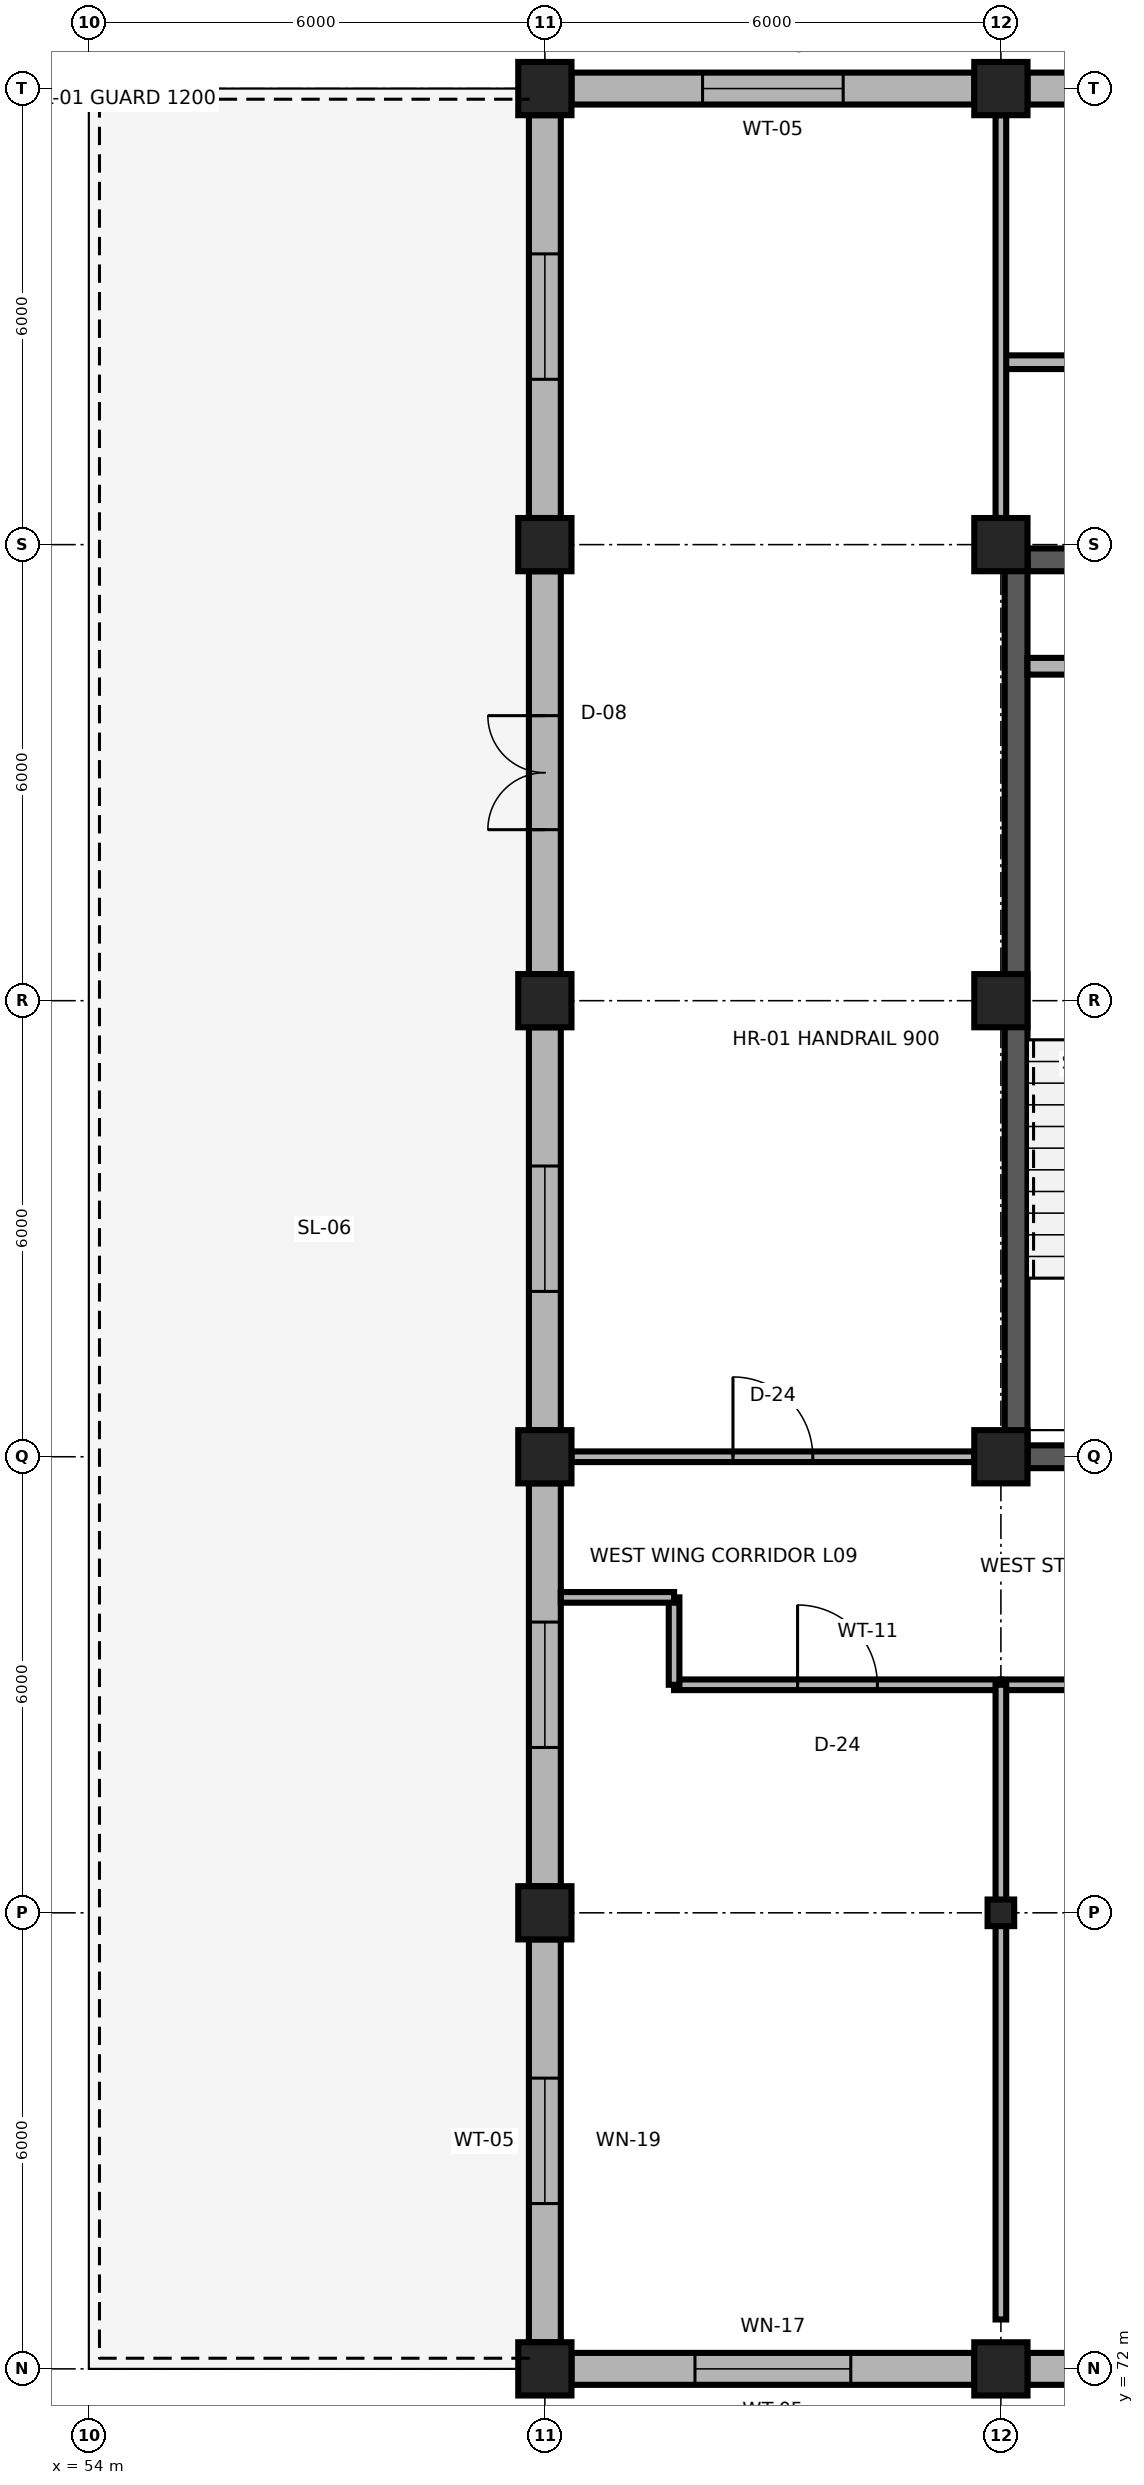
"""IFC4 building model, lengths in metres.
Left out: names, types, materials, properties, quantities, classifications, styles, units other than length and angle.
Written with IfcOpenShell. Run it as: python <this file> out.ifc"""

import sys

from ifc_helpers import new_model, si_unit, direction, frame, frame_2d, origin, origin_2d, place, context, subcontext, project, spatial, rectangle, i_section, extrude, element, fill, save


model = new_model("IFC4")
c1 = context("Model", 3, precision=1e-05, world=origin(), true_north=direction((0.0, 1.0)))
c2 = subcontext(c1, "Body", "Model", "MODEL_VIEW")
j1 = project(units=[si_unit("LENGTHUNIT", "METRE"), si_unit("PLANEANGLEUNIT", "RADIAN")], contexts=[c1])
p1 = place(None, origin())
s1 = spatial("IfcSite", under=j1, at=p1, CompositionType="ELEMENT")
p2 = place(p1, origin())
s2 = spatial("IfcBuilding", under=s1, at=p2, CompositionType="ELEMENT")
p3 = place(p2, frame((0.0, 0.0, 36.6)))
s3 = spatial("IfcBuildingStorey", under=s2, at=p3, CompositionType="ELEMENT", Elevation=36.6)
for number, where, z_axis, x_axis in (
    (1, (60.0, 72.0, 0.0), (0.0, 0.0, 1.0), (1.0, 0.0, 0.0)),
    (2, (66.0, 72.0, 0.0), (0.0, 0.0, 1.0), (1.0, 0.0, 0.0)),
    (3, (60.0, 78.0, 0.0), (0.0, 0.0, 1.0), (1.0, 0.0, 0.0)),
):
    element("IfcColumn", number, at=place(p3, frame(where, z_axis=z_axis, x_axis=x_axis)), inside=s3, PredefinedType="COLUMN", context=c2, shape_type="SweptSolid", body=[
        extrude(rectangle(XDim=0.7, YDim=0.7, at=origin_2d()), origin(), (0.0, 0.0, 1.0), 3.9),
    ])
p4 = place(p3, frame((66.0, 78.0, 0.0), z_axis=(0.0, 0.0, 1.0), x_axis=(1.0, 0.0, 0.0)))
e4 = element("IfcColumn", 4, at=p4, inside=s3, PredefinedType="COLUMN", context=c2, shape_type="SweptSolid", body=[
    extrude(i_section(OverallWidth=0.35, OverallDepth=0.35, WebThickness=0.012, FlangeThickness=0.019, FilletRadius=0.02, at=origin_2d()), origin(), (0.0, 0.0, 1.0), 3.9),
])
for number, where, z_axis, x_axis in (
    (5, (60.0, 84.0, 0.0), (0.0, 0.0, 1.0), (1.0, 0.0, 0.0)),
    (6, (66.0, 84.0, 0.0), (0.0, 0.0, 1.0), (1.0, 0.0, 0.0)),
    (7, (60.0, 90.0, 0.0), (0.0, 0.0, 1.0), (1.0, 0.0, 0.0)),
    (8, (66.0, 90.0, 0.0), (0.0, 0.0, 1.0), (1.0, 0.0, 0.0)),
    (9, (60.0, 96.0, 0.0), (0.0, 0.0, 1.0), (1.0, 0.0, 0.0)),
    (10, (66.0, 96.0, 0.0), (0.0, 0.0, 1.0), (1.0, 0.0, 0.0)),
    (11, (60.0, 102.0, 0.0), (0.0, 0.0, 1.0), (1.0, 0.0, 0.0)),
    (12, (66.0, 102.0, 0.0), (0.0, 0.0, 1.0), (1.0, 0.0, 0.0)),
):
    element("IfcColumn", number, at=place(p3, frame(where, z_axis=z_axis, x_axis=x_axis)), inside=s3, PredefinedType="COLUMN", context=c2, shape_type="SweptSolid", body=[
        extrude(rectangle(XDim=0.7, YDim=0.7, at=origin_2d()), origin(), (0.0, 0.0, 1.0), 3.9),
    ])
p5 = place(p3, frame((60.35, 72.0, 0.0), z_axis=(0.0, 0.0, 1.0), x_axis=(1.0, 0.0, 0.0)))
e13 = element("IfcWall", 13, at=p5, inside=s3, PredefinedType="SOLIDWALL", context=c2, shape_type="SweptSolid", body=[
    extrude(rectangle(XDim=5.3, YDim=0.42, at=frame_2d((2.65, 0.0))), origin(), (0.0, 0.0, 1.0), 3.32),
])
p6 = place(p5, frame((1.625, 0.0, 0.85)))
e14 = element("IfcOpeningElement", 14, at=p6, cuts=e13, PredefinedType="OPENING", context=c2, shape_type="SweptSolid", body=[
    extrude(rectangle(XDim=2.05, YDim=2.0, at=frame_2d((1.025, 1.0))), frame((0.0, 0.225, 0.0), z_axis=(0.0, -1.0, 0.0), x_axis=(1.0, 0.0, 0.0)), (0.0, 0.0, 1.0), 0.45),
])
p7 = place(p3, frame((66.35, 72.0, 0.0), z_axis=(0.0, 0.0, 1.0), x_axis=(1.0, 0.0, 0.0)))
e15 = element("IfcWall", 15, at=p7, inside=s3, PredefinedType="SOLIDWALL", context=c2, shape_type="SweptSolid", body=[
    extrude(rectangle(XDim=5.3, YDim=0.42, at=frame_2d((2.65, 0.0))), origin(), (0.0, 0.0, 1.0), 3.32),
])
p8 = place(p7, frame((1.625, 0.0, 0.85)))
e16 = element("IfcOpeningElement", 16, at=p8, cuts=e15, PredefinedType="OPENING", context=c2, shape_type="SweptSolid", body=[
    extrude(rectangle(XDim=2.05, YDim=2.0, at=frame_2d((1.025, 1.0))), frame((0.0, 0.225, 0.0), z_axis=(0.0, -1.0, 0.0), x_axis=(1.0, 0.0, 0.0)), (0.0, 0.0, 1.0), 0.45),
])
p9 = place(p3, frame((60.35, 102.0, 0.0), z_axis=(0.0, 0.0, 1.0), x_axis=(1.0, 0.0, 0.0)))
e17 = element("IfcWall", 17, at=p9, inside=s3, PredefinedType="SOLIDWALL", context=c2, shape_type="SweptSolid", body=[
    extrude(rectangle(XDim=5.3, YDim=0.42, at=frame_2d((2.65, 0.0))), origin(), (0.0, 0.0, 1.0), 3.32),
])
p10 = place(p9, frame((1.725, 0.0, 0.85)))
e18 = element("IfcOpeningElement", 18, at=p10, cuts=e17, PredefinedType="OPENING", context=c2, shape_type="SweptSolid", body=[
    extrude(rectangle(XDim=1.85, YDim=2.0, at=frame_2d((0.925, 1.0))), frame((0.0, 0.225, 0.0), z_axis=(0.0, -1.0, 0.0), x_axis=(1.0, 0.0, 0.0)), (0.0, 0.0, 1.0), 0.45),
])
p11 = place(p3, frame((66.35, 102.0, 0.0), z_axis=(0.0, 0.0, 1.0), x_axis=(1.0, 0.0, 0.0)))
e19 = element("IfcWall", 19, at=p11, inside=s3, PredefinedType="SOLIDWALL", context=c2, shape_type="SweptSolid", body=[
    extrude(rectangle(XDim=5.3, YDim=0.42, at=frame_2d((2.65, 0.0))), origin(), (0.0, 0.0, 1.0), 3.32),
])
p12 = place(p11, frame((1.725, 0.0, 0.85)))
e20 = element("IfcOpeningElement", 20, at=p12, cuts=e19, PredefinedType="OPENING", context=c2, shape_type="SweptSolid", body=[
    extrude(rectangle(XDim=1.85, YDim=2.0, at=frame_2d((0.925, 1.0))), frame((0.0, 0.225, 0.0), z_axis=(0.0, -1.0, 0.0), x_axis=(1.0, 0.0, 0.0)), (0.0, 0.0, 1.0), 0.45),
])
p13 = place(p3, frame((60.0, 72.35, 0.0), z_axis=(0.0, 0.0, 1.0), x_axis=(0.0, 1.0, 0.0)))
e21 = element("IfcWall", 21, at=p13, inside=s3, PredefinedType="SOLIDWALL", context=c2, shape_type="SweptSolid", body=[
    extrude(rectangle(XDim=5.3, YDim=0.42, at=frame_2d((2.65, 0.0))), origin(), (0.0, 0.0, 1.0), 3.32),
])
p14 = place(p13, frame((1.825, 0.0, 0.85)))
e22 = element("IfcOpeningElement", 22, at=p14, cuts=e21, PredefinedType="OPENING", context=c2, shape_type="SweptSolid", body=[
    extrude(rectangle(XDim=1.65, YDim=1.95, at=frame_2d((0.825, 0.975))), frame((0.0, 0.225, 0.0), z_axis=(0.0, -1.0, 0.0), x_axis=(1.0, 0.0, 0.0)), (0.0, 0.0, 1.0), 0.45),
])
p15 = place(p3, frame((60.0, 78.35, 0.0), z_axis=(0.0, 0.0, 1.0), x_axis=(0.0, 1.0, 0.0)))
e23 = element("IfcWall", 23, at=p15, inside=s3, PredefinedType="SOLIDWALL", context=c2, shape_type="SweptSolid", body=[
    extrude(rectangle(XDim=5.3, YDim=0.42, at=frame_2d((2.65, 0.0))), origin(), (0.0, 0.0, 1.0), 3.32),
])
p16 = place(p15, frame((1.825, 0.0, 0.85)))
e24 = element("IfcOpeningElement", 24, at=p16, cuts=e23, PredefinedType="OPENING", context=c2, shape_type="SweptSolid", body=[
    extrude(rectangle(XDim=1.65, YDim=1.95, at=frame_2d((0.825, 0.975))), frame((0.0, 0.225, 0.0), z_axis=(0.0, -1.0, 0.0), x_axis=(1.0, 0.0, 0.0)), (0.0, 0.0, 1.0), 0.45),
])
p17 = place(p3, frame((60.0, 84.35, 0.0), z_axis=(0.0, 0.0, 1.0), x_axis=(0.0, 1.0, 0.0)))
e25 = element("IfcWall", 25, at=p17, inside=s3, PredefinedType="SOLIDWALL", context=c2, shape_type="SweptSolid", body=[
    extrude(rectangle(XDim=5.3, YDim=0.42, at=frame_2d((2.65, 0.0))), origin(), (0.0, 0.0, 1.0), 3.32),
])
p18 = place(p17, frame((1.825, 0.0, 0.85)))
e26 = element("IfcOpeningElement", 26, at=p18, cuts=e25, PredefinedType="OPENING", context=c2, shape_type="SweptSolid", body=[
    extrude(rectangle(XDim=1.65, YDim=1.95, at=frame_2d((0.825, 0.975))), frame((0.0, 0.225, 0.0), z_axis=(0.0, -1.0, 0.0), x_axis=(1.0, 0.0, 0.0)), (0.0, 0.0, 1.0), 0.45),
])
p19 = place(p3, frame((60.0, 90.35, 0.0), z_axis=(0.0, 0.0, 1.0), x_axis=(0.0, 1.0, 0.0)))
e27 = element("IfcWall", 27, at=p19, inside=s3, PredefinedType="SOLIDWALL", context=c2, shape_type="SweptSolid", body=[
    extrude(rectangle(XDim=5.3, YDim=0.42, at=frame_2d((2.65, 0.0))), origin(), (0.0, 0.0, 1.0), 3.32),
])
p20 = place(p19, frame((1.9, 0.0, 0.0)))
e28 = element("IfcOpeningElement", 28, at=p20, cuts=e27, PredefinedType="OPENING", context=c2, shape_type="SweptSolid", body=[
    extrude(rectangle(XDim=1.5, YDim=2.3, at=frame_2d((0.75, 1.15))), frame((0.0, 0.225, 0.0), z_axis=(0.0, -1.0, 0.0), x_axis=(1.0, 0.0, 0.0)), (0.0, 0.0, 1.0), 0.45),
])
p21 = place(p3, frame((60.0, 96.35, 0.0), z_axis=(0.0, 0.0, 1.0), x_axis=(0.0, 1.0, 0.0)))
e29 = element("IfcWall", 29, at=p21, inside=s3, PredefinedType="SOLIDWALL", context=c2, shape_type="SweptSolid", body=[
    extrude(rectangle(XDim=5.3, YDim=0.42, at=frame_2d((2.65, 0.0))), origin(), (0.0, 0.0, 1.0), 3.32),
])
p22 = place(p21, frame((1.825, 0.0, 0.85)))
e30 = element("IfcOpeningElement", 30, at=p22, cuts=e29, PredefinedType="OPENING", context=c2, shape_type="SweptSolid", body=[
    extrude(rectangle(XDim=1.65, YDim=1.95, at=frame_2d((0.825, 0.975))), frame((0.0, 0.225, 0.0), z_axis=(0.0, -1.0, 0.0), x_axis=(1.0, 0.0, 0.0)), (0.0, 0.0, 1.0), 0.45),
])
p23 = place(p3, frame((66.35, 84.0, 0.0), z_axis=(0.0, 0.0, 1.0), x_axis=(1.0, 0.0, 0.0)))
e31 = element("IfcWall", 31, at=p23, inside=s3, PredefinedType="SHEAR", context=c2, shape_type="SweptSolid", body=[
    extrude(rectangle(XDim=5.3, YDim=0.3, at=frame_2d((2.65, 0.0))), origin(), (0.0, 0.0, 1.0), 3.66),
])
p24 = place(p23, frame((1.975, 0.0, 0.0)))
e32 = element("IfcOpeningElement", 32, at=p24, cuts=e31, PredefinedType="OPENING", context=c2, shape_type="SweptSolid", body=[
    extrude(rectangle(XDim=1.35, YDim=2.2, at=frame_2d((0.675, 1.1))), frame((0.0, 0.165, 0.0), z_axis=(0.0, -1.0, 0.0), x_axis=(1.0, 0.0, 0.0)), (0.0, 0.0, 1.0), 0.33),
])
p25 = place(p3, frame((66.35, 95.8, 0.0), z_axis=(0.0, 0.0, 1.0), x_axis=(1.0, 0.0, 0.0)))
e33 = element("IfcWall", 33, at=p25, inside=s3, PredefinedType="SHEAR", context=c2, shape_type="SweptSolid", body=[
    extrude(rectangle(XDim=5.3, YDim=0.3, at=frame_2d((2.65, 0.0))), origin(), (0.0, 0.0, 1.0), 3.74),
])
p26 = place(p3, frame((66.2, 84.0, 0.0), z_axis=(0.0, 0.0, 1.0), x_axis=(0.0, 1.0, 0.0)))
e34 = element("IfcWall", 34, at=p26, inside=s3, PredefinedType="SHEAR", context=c2, shape_type="SweptSolid", body=[
    extrude(rectangle(XDim=11.8, YDim=0.3, at=frame_2d((5.9, 0.0))), origin(), (0.0, 0.0, 1.0), 3.74),
])
p27 = place(p3, frame((66.35, 94.4, 0.0), z_axis=(0.0, 0.0, 1.0), x_axis=(1.0, 0.0, 0.0)))
e35 = element("IfcWall", 35, at=p27, inside=s3, PredefinedType="PARTITIONING", context=c2, shape_type="SweptSolid", body=[
    extrude(rectangle(XDim=1.1, YDim=0.22, at=frame_2d((0.55, 0.0))), origin(), (0.0, 0.0, 1.0), 3.74),
])
p28 = place(p3, frame((61.7, 81.0, 0.0), z_axis=(0.0, 0.0, 1.0), x_axis=(1.0, 0.0, 0.0)))
e36 = element("IfcWall", 36, at=p28, inside=s3, PredefinedType="PARTITIONING", context=c2, shape_type="SweptSolid", body=[
    extrude(rectangle(XDim=4.3, YDim=0.14, at=frame_2d((2.15, 0.0))), origin(), (0.0, 0.0, 1.0), 3.74),
])
p29 = place(p28, frame((1.625, 0.0, 0.0)))
e37 = element("IfcOpeningElement", 37, at=p29, cuts=e36, PredefinedType="OPENING", context=c2, shape_type="SweptSolid", body=[
    extrude(rectangle(XDim=1.05, YDim=2.25, at=frame_2d((0.525, 1.125))), frame((0.0, 0.085, 0.0), z_axis=(0.0, -1.0, 0.0), x_axis=(1.0, 0.0, 0.0)), (0.0, 0.0, 1.0), 0.17),
])
p30 = place(p3, frame((66.0, 81.0, 0.0), z_axis=(0.0, 0.0, 1.0), x_axis=(1.0, 0.0, 0.0)))
e38 = element("IfcWall", 38, at=p30, inside=s3, PredefinedType="PARTITIONING", context=c2, shape_type="SweptSolid", body=[
    extrude(rectangle(XDim=6.0, YDim=0.14, at=frame_2d((3.0, 0.0))), origin(), (0.0, 0.0, 1.0), 3.74),
])
p31 = place(p30, frame((2.475, 0.0, 0.0)))
e39 = element("IfcOpeningElement", 39, at=p31, cuts=e38, PredefinedType="OPENING", context=c2, shape_type="SweptSolid", body=[
    extrude(rectangle(XDim=1.05, YDim=2.25, at=frame_2d((0.525, 1.125))), frame((0.0, 0.085, 0.0), z_axis=(0.0, -1.0, 0.0), x_axis=(1.0, 0.0, 0.0)), (0.0, 0.0, 1.0), 0.17),
])
p32 = place(p3, frame((60.35, 84.0, 0.0), z_axis=(0.0, 0.0, 1.0), x_axis=(1.0, 0.0, 0.0)))
e40 = element("IfcWall", 40, at=p32, inside=s3, PredefinedType="PARTITIONING", context=c2, shape_type="SweptSolid", body=[
    extrude(rectangle(XDim=5.3, YDim=0.14, at=frame_2d((2.65, 0.0))), origin(), (0.0, 0.0, 1.0), 3.348),
])
p33 = place(p32, frame((2.125, 0.0, 0.0)))
e41 = element("IfcOpeningElement", 41, at=p33, cuts=e40, PredefinedType="OPENING", context=c2, shape_type="SweptSolid", body=[
    extrude(rectangle(XDim=1.05, YDim=2.25, at=frame_2d((0.525, 1.125))), frame((0.0, 0.085, 0.0), z_axis=(0.0, -1.0, 0.0), x_axis=(1.0, 0.0, 0.0)), (0.0, 0.0, 1.0), 0.17),
])
p34 = place(p3, frame((66.0, 72.65, 0.0), z_axis=(0.0, 0.0, 1.0), x_axis=(0.0, 1.0, 0.0)))
e42 = element("IfcWall", 42, at=p34, inside=s3, PredefinedType="PARTITIONING", context=c2, shape_type="SweptSolid", body=[
    extrude(rectangle(XDim=8.35, YDim=0.14, at=frame_2d((4.175, 0.0))), origin(), (0.0, 0.0, 1.0), 3.348),
])
p35 = place(p3, frame((61.7, 81.0, 0.0), z_axis=(0.0, 0.0, 1.0), x_axis=(0.0, 1.0, 0.0)))
e43 = element("IfcWall", 43, at=p35, inside=s3, PredefinedType="PARTITIONING", context=c2, shape_type="SweptSolid", body=[
    extrude(rectangle(XDim=1.15, YDim=0.14, at=frame_2d((0.575, 0.0))), origin(), (0.0, 0.0, 1.0), 3.74),
])
p36 = place(p3, frame((61.7, 82.15, 0.0), z_axis=(0.0, 0.0, 1.0), x_axis=(-1.0, 0.0, 0.0)))
e44 = element("IfcWall", 44, at=p36, inside=s3, PredefinedType="PARTITIONING", context=c2, shape_type="SweptSolid", body=[
    extrude(rectangle(XDim=1.49, YDim=0.14, at=frame_2d((0.745, 0.0))), origin(), (0.0, 0.0, 1.0), 3.74),
])
p37 = place(p3, frame((66.0, 98.4, 0.0), z_axis=(0.0, 0.0, 1.0), x_axis=(1.0, 0.0, 0.0)))
e45 = element("IfcWall", 45, at=p37, inside=s3, PredefinedType="PARTITIONING", context=c2, shape_type="SweptSolid", body=[
    extrude(rectangle(XDim=6.0, YDim=0.18, at=frame_2d((3.0, 0.0))), origin(), (0.0, 0.0, 1.0), 3.74),
])
p38 = place(p3, frame((66.0, 96.35, 0.0), z_axis=(0.0, 0.0, 1.0), x_axis=(0.0, 1.0, 0.0)))
e46 = element("IfcWall", 46, at=p38, inside=s3, PredefinedType="PARTITIONING", context=c2, shape_type="SweptSolid", body=[
    extrude(rectangle(XDim=5.3, YDim=0.14, at=frame_2d((2.65, 0.0))), origin(), (0.0, 0.0, 1.0), 3.348),
])
p39 = place(p6, origin())
e47 = element("IfcWindow", 47, at=p39, inside=s3, PartitioningType="SINGLE_PANEL", PredefinedType="WINDOW", context=c2, shape_type="SweptSolid", body=[
    extrude(rectangle(XDim=2.05, YDim=2.0, at=frame_2d((1.025, 1.0))), frame((0.0, 0.03, 0.0), z_axis=(0.0, -1.0, 0.0), x_axis=(1.0, 0.0, 0.0)), (0.0, 0.0, 1.0), 0.06),
])
fill(e14, e47)
p40 = place(p10, origin())
e48 = element("IfcWindow", 48, at=p40, inside=s3, PartitioningType="SINGLE_PANEL", PredefinedType="WINDOW", context=c2, shape_type="SweptSolid", body=[
    extrude(rectangle(XDim=1.85, YDim=2.0, at=frame_2d((0.925, 1.0))), frame((0.0, 0.03, 0.0), z_axis=(0.0, -1.0, 0.0), x_axis=(1.0, 0.0, 0.0)), (0.0, 0.0, 1.0), 0.06),
])
fill(e18, e48)
p41 = place(p14, origin())
e49 = element("IfcWindow", 49, at=p41, inside=s3, PartitioningType="SINGLE_PANEL", PredefinedType="WINDOW", context=c2, shape_type="SweptSolid", body=[
    extrude(rectangle(XDim=1.65, YDim=1.95, at=frame_2d((0.825, 0.975))), frame((0.0, 0.03, 0.0), z_axis=(0.0, -1.0, 0.0), x_axis=(1.0, 0.0, 0.0)), (0.0, 0.0, 1.0), 0.06),
])
fill(e22, e49)
p42 = place(p16, origin())
e50 = element("IfcWindow", 50, at=p42, inside=s3, PartitioningType="SINGLE_PANEL", PredefinedType="WINDOW", context=c2, shape_type="SweptSolid", body=[
    extrude(rectangle(XDim=1.65, YDim=1.95, at=frame_2d((0.825, 0.975))), frame((0.0, 0.03, 0.0), z_axis=(0.0, -1.0, 0.0), x_axis=(1.0, 0.0, 0.0)), (0.0, 0.0, 1.0), 0.06),
])
fill(e24, e50)
p43 = place(p18, origin())
e51 = element("IfcWindow", 51, at=p43, inside=s3, PartitioningType="SINGLE_PANEL", PredefinedType="WINDOW", context=c2, shape_type="SweptSolid", body=[
    extrude(rectangle(XDim=1.65, YDim=1.95, at=frame_2d((0.825, 0.975))), frame((0.0, 0.03, 0.0), z_axis=(0.0, -1.0, 0.0), x_axis=(1.0, 0.0, 0.0)), (0.0, 0.0, 1.0), 0.06),
])
fill(e26, e51)
p44 = place(p20, origin())
e52 = element("IfcDoor", 52, at=p44, inside=s3, OperationType="DOUBLE_DOOR_SINGLE_SWING", PredefinedType="DOOR", context=c2, shape_type="SweptSolid", body=[
    extrude(rectangle(XDim=1.5, YDim=2.3, at=frame_2d((0.75, 1.15))), frame((0.0, 0.025, 0.0), z_axis=(0.0, -1.0, 0.0), x_axis=(1.0, 0.0, 0.0)), (0.0, 0.0, 1.0), 0.05),
])
fill(e28, e52)
p45 = place(p22, origin())
e53 = element("IfcWindow", 53, at=p45, inside=s3, PartitioningType="SINGLE_PANEL", PredefinedType="WINDOW", context=c2, shape_type="SweptSolid", body=[
    extrude(rectangle(XDim=1.65, YDim=1.95, at=frame_2d((0.825, 0.975))), frame((0.0, 0.03, 0.0), z_axis=(0.0, -1.0, 0.0), x_axis=(1.0, 0.0, 0.0)), (0.0, 0.0, 1.0), 0.06),
])
fill(e30, e53)
p46 = place(p29, origin())
e54 = element("IfcDoor", 54, at=p46, inside=s3, OperationType="SINGLE_SWING_LEFT", PredefinedType="DOOR", context=c2, shape_type="SweptSolid", body=[
    extrude(rectangle(XDim=1.05, YDim=2.25, at=frame_2d((0.525, 1.125))), frame((0.0, 0.025, 0.0), z_axis=(0.0, -1.0, 0.0), x_axis=(1.0, 0.0, 0.0)), (0.0, 0.0, 1.0), 0.05),
])
fill(e37, e54)
p47 = place(p33, origin())
e55 = element("IfcDoor", 55, at=p47, inside=s3, OperationType="SINGLE_SWING_LEFT", PredefinedType="DOOR", context=c2, shape_type="SweptSolid", body=[
    extrude(rectangle(XDim=1.05, YDim=2.25, at=frame_2d((0.525, 1.125))), frame((0.0, 0.025, 0.0), z_axis=(0.0, -1.0, 0.0), x_axis=(1.0, 0.0, 0.0)), (0.0, 0.0, 1.0), 0.05),
])
fill(e41, e55)
save(model, sys.argv[1])
